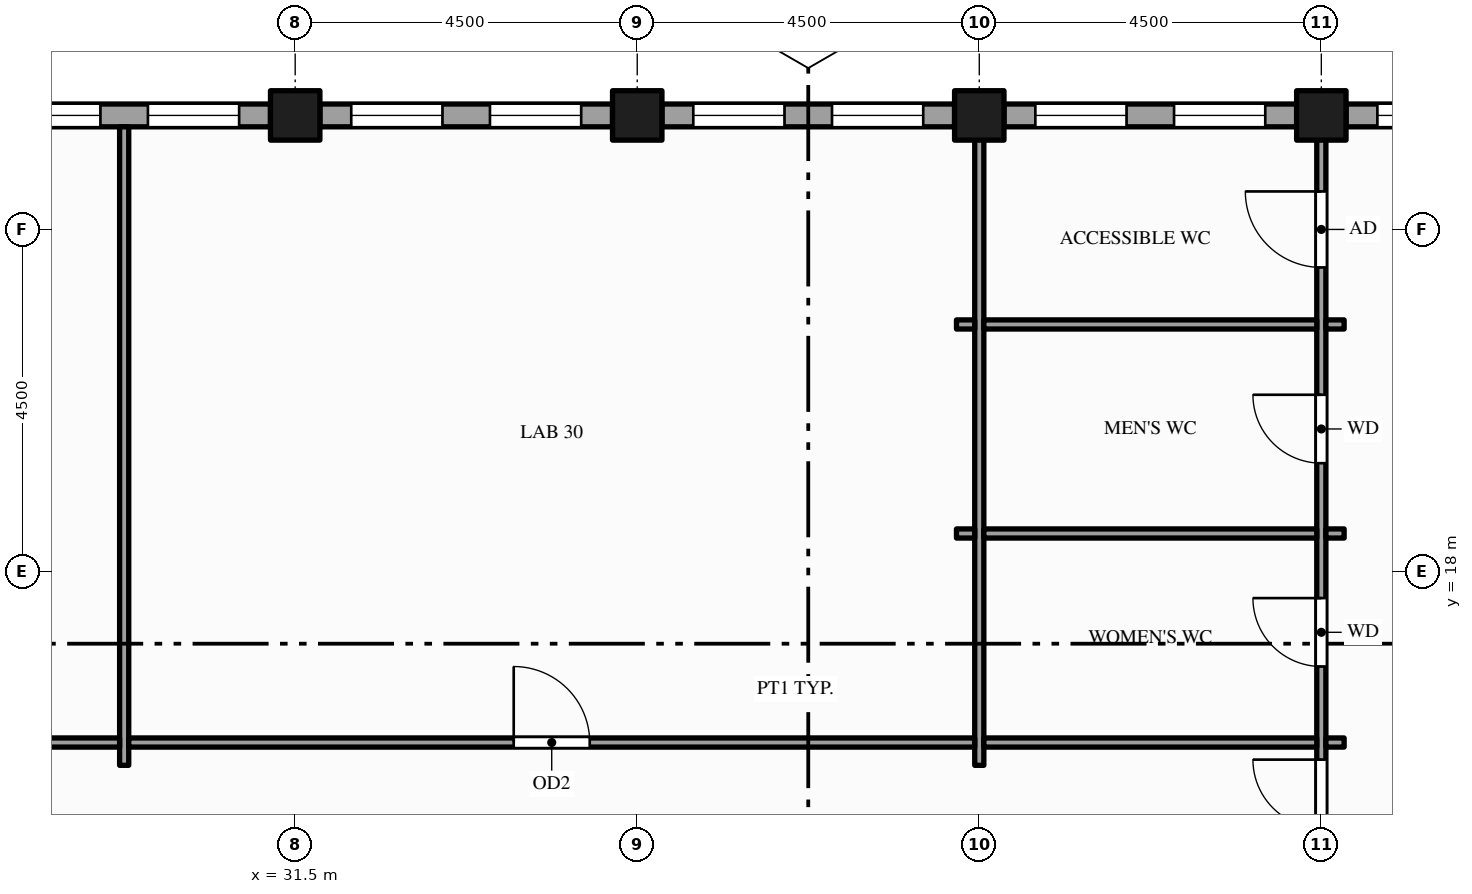
"""IFC4 building model, lengths in metres.
Left out: names, types, materials, properties, quantities, classifications, styles, units other than length and angle.
Written with IfcOpenShell. Run it as: python <this file> out.ifc"""

import sys

from ifc_helpers import new_model, si_unit, direction, frame, frame_2d, origin, origin_2d, place, context, subcontext, project, spatial, rectangle, hollow_rectangle, extrude, element, fill, save


model = new_model("IFC4")
c1 = context("Model", 3, precision=1e-05, world=origin(), true_north=direction((0.0, 1.0)))
c2 = subcontext(c1, "Body", "Model", "MODEL_VIEW")
j1 = project(units=[si_unit("LENGTHUNIT", "METRE"), si_unit("PLANEANGLEUNIT", "RADIAN")], contexts=[c1])
p1 = place(None, origin())
s1 = spatial("IfcSite", under=j1, at=p1, CompositionType="ELEMENT")
p2 = place(p1, origin())
s2 = spatial("IfcBuilding", under=s1, at=p2, CompositionType="ELEMENT")
p3 = place(p2, frame((0.0, 0.0, 281.0)))
s3 = spatial("IfcBuildingStorey", under=s2, at=p3, CompositionType="ELEMENT", Elevation=281.0)
for number, where, z_axis, x_axis in (
    (1, (31.5, 24.0, -0.15), (0.0, 0.0, 1.0), (1.0, 0.0, 0.0)),
    (2, (36.0, 24.0, -0.15), (0.0, 0.0, 1.0), (1.0, 0.0, 0.0)),
    (3, (40.5, 24.0, -0.15), (0.0, 0.0, 1.0), (1.0, 0.0, 0.0)),
    (4, (45.0, 24.0, -0.15), (0.0, 0.0, 1.0), (1.0, 0.0, 0.0)),
):
    element("IfcColumn", number, at=place(p3, frame(where, z_axis=z_axis, x_axis=x_axis)), inside=s3, PredefinedType="COLUMN", context=c2, shape_type="SweptSolid", body=[
        extrude(hollow_rectangle(XDim=0.65, YDim=0.65, WallThickness=0.032, at=origin_2d()), origin(), (0.0, 0.0, 1.0), 4.0),
    ])
p4 = place(p3, frame((49.175, 24.0, 0.0), z_axis=(0.0, 0.0, 1.0), x_axis=(-1.0, 0.0, 0.0)))
e5 = element("IfcWall", 5, at=p4, inside=s3, PredefinedType="STANDARD", context=c2, shape_type="SweptSolid", body=[
    extrude(rectangle(XDim=3.85, YDim=0.3, at=frame_2d((1.925, 0.0))), origin(), (0.0, 0.0, 1.0), 2.87),
])
p5 = place(p4, frame((0.413, 0.0, 0.9)))
e6 = element("IfcOpeningElement", 6, at=p5, cuts=e5, PredefinedType="OPENING", context=c2, shape_type="SweptSolid", body=[
    extrude(rectangle(XDim=1.2, YDim=1.75, at=frame_2d((0.6, 0.875))), frame((0.0, 0.16, 0.0), z_axis=(0.0, -1.0, 0.0), x_axis=(1.0, 0.0, 0.0)), (0.0, 0.0, 1.0), 0.32),
])
p6 = place(p4, frame((2.238, 0.0, 0.9)))
e7 = element("IfcOpeningElement", 7, at=p6, cuts=e5, PredefinedType="OPENING", context=c2, shape_type="SweptSolid", body=[
    extrude(rectangle(XDim=1.2, YDim=1.75, at=frame_2d((0.6, 0.875))), frame((0.0, 0.16, 0.0), z_axis=(0.0, -1.0, 0.0), x_axis=(1.0, 0.0, 0.0)), (0.0, 0.0, 1.0), 0.32),
])
p7 = place(p3, frame((44.675, 24.0, 0.0), z_axis=(0.0, 0.0, 1.0), x_axis=(-1.0, 0.0, 0.0)))
e8 = element("IfcWall", 8, at=p7, inside=s3, PredefinedType="STANDARD", context=c2, shape_type="SweptSolid", body=[
    extrude(rectangle(XDim=3.85, YDim=0.3, at=frame_2d((1.925, 0.0))), origin(), (0.0, 0.0, 1.0), 2.87),
])
p8 = place(p7, frame((0.413, 0.0, 0.9)))
e9 = element("IfcOpeningElement", 9, at=p8, cuts=e8, PredefinedType="OPENING", context=c2, shape_type="SweptSolid", body=[
    extrude(rectangle(XDim=1.2, YDim=1.75, at=frame_2d((0.6, 0.875))), frame((0.0, 0.16, 0.0), z_axis=(0.0, -1.0, 0.0), x_axis=(1.0, 0.0, 0.0)), (0.0, 0.0, 1.0), 0.32),
])
p9 = place(p7, frame((2.238, 0.0, 0.9)))
e10 = element("IfcOpeningElement", 10, at=p9, cuts=e8, PredefinedType="OPENING", context=c2, shape_type="SweptSolid", body=[
    extrude(rectangle(XDim=1.2, YDim=1.75, at=frame_2d((0.6, 0.875))), frame((0.0, 0.16, 0.0), z_axis=(0.0, -1.0, 0.0), x_axis=(1.0, 0.0, 0.0)), (0.0, 0.0, 1.0), 0.32),
])
p10 = place(p3, frame((40.175, 24.0, 0.0), z_axis=(0.0, 0.0, 1.0), x_axis=(-1.0, 0.0, 0.0)))
e11 = element("IfcWall", 11, at=p10, inside=s3, PredefinedType="STANDARD", context=c2, shape_type="SweptSolid", body=[
    extrude(rectangle(XDim=3.85, YDim=0.3, at=frame_2d((1.925, 0.0))), origin(), (0.0, 0.0, 1.0), 2.87),
])
p11 = place(p10, frame((0.413, 0.0, 0.9)))
e12 = element("IfcOpeningElement", 12, at=p11, cuts=e11, PredefinedType="OPENING", context=c2, shape_type="SweptSolid", body=[
    extrude(rectangle(XDim=1.2, YDim=1.75, at=frame_2d((0.6, 0.875))), frame((0.0, 0.16, 0.0), z_axis=(0.0, -1.0, 0.0), x_axis=(1.0, 0.0, 0.0)), (0.0, 0.0, 1.0), 0.32),
])
p12 = place(p10, frame((2.238, 0.0, 0.9)))
e13 = element("IfcOpeningElement", 13, at=p12, cuts=e11, PredefinedType="OPENING", context=c2, shape_type="SweptSolid", body=[
    extrude(rectangle(XDim=1.2, YDim=1.75, at=frame_2d((0.6, 0.875))), frame((0.0, 0.16, 0.0), z_axis=(0.0, -1.0, 0.0), x_axis=(1.0, 0.0, 0.0)), (0.0, 0.0, 1.0), 0.32),
])
p13 = place(p3, frame((35.675, 24.0, 0.0), z_axis=(0.0, 0.0, 1.0), x_axis=(-1.0, 0.0, 0.0)))
e14 = element("IfcWall", 14, at=p13, inside=s3, PredefinedType="STANDARD", context=c2, shape_type="SweptSolid", body=[
    extrude(rectangle(XDim=3.85, YDim=0.3, at=frame_2d((1.925, 0.0))), origin(), (0.0, 0.0, 1.0), 2.87),
])
p14 = place(p13, frame((0.413, 0.0, 0.9)))
e15 = element("IfcOpeningElement", 15, at=p14, cuts=e14, PredefinedType="OPENING", context=c2, shape_type="SweptSolid", body=[
    extrude(rectangle(XDim=1.2, YDim=1.75, at=frame_2d((0.6, 0.875))), frame((0.0, 0.16, 0.0), z_axis=(0.0, -1.0, 0.0), x_axis=(1.0, 0.0, 0.0)), (0.0, 0.0, 1.0), 0.32),
])
p15 = place(p13, frame((2.238, 0.0, 0.9)))
e16 = element("IfcOpeningElement", 16, at=p15, cuts=e14, PredefinedType="OPENING", context=c2, shape_type="SweptSolid", body=[
    extrude(rectangle(XDim=1.2, YDim=1.75, at=frame_2d((0.6, 0.875))), frame((0.0, 0.16, 0.0), z_axis=(0.0, -1.0, 0.0), x_axis=(1.0, 0.0, 0.0)), (0.0, 0.0, 1.0), 0.32),
])
p16 = place(p3, frame((31.175, 24.0, 0.0), z_axis=(0.0, 0.0, 1.0), x_axis=(-1.0, 0.0, 0.0)))
e17 = element("IfcWall", 17, at=p16, inside=s3, PredefinedType="STANDARD", context=c2, shape_type="SweptSolid", body=[
    extrude(rectangle(XDim=3.85, YDim=0.3, at=frame_2d((1.925, 0.0))), origin(), (0.0, 0.0, 1.0), 2.87),
])
p17 = place(p16, frame((0.413, 0.0, 0.9)))
e18 = element("IfcOpeningElement", 18, at=p17, cuts=e17, PredefinedType="OPENING", context=c2, shape_type="SweptSolid", body=[
    extrude(rectangle(XDim=1.2, YDim=1.75, at=frame_2d((0.6, 0.875))), frame((0.0, 0.16, 0.0), z_axis=(0.0, -1.0, 0.0), x_axis=(1.0, 0.0, 0.0)), (0.0, 0.0, 1.0), 0.32),
])
p18 = place(p16, frame((2.238, 0.0, 0.9)))
e19 = element("IfcOpeningElement", 19, at=p18, cuts=e17, PredefinedType="OPENING", context=c2, shape_type="SweptSolid", body=[
    extrude(rectangle(XDim=1.2, YDim=1.75, at=frame_2d((0.6, 0.875))), frame((0.0, 0.16, 0.0), z_axis=(0.0, -1.0, 0.0), x_axis=(1.0, 0.0, 0.0)), (0.0, 0.0, 1.0), 0.32),
])
for number, where, z_axis, x_axis in (
    (20, (29.25, 15.45, 0.0), (0.0, 0.0, 1.0), (0.0, 1.0, 0.0)),
    (21, (40.5, 15.45, 0.0), (0.0, 0.0, 1.0), (0.0, 1.0, 0.0)),
):
    element("IfcWall", number, at=place(p3, frame(where, z_axis=z_axis, x_axis=x_axis)), inside=s3, PredefinedType="PARTITIONING", context=c2, shape_type="SweptSolid", body=[
        extrude(rectangle(XDim=8.4, YDim=0.12, at=frame_2d((4.2, 0.0))), origin(), (0.0, 0.0, 1.0), 2.87),
    ])
p19 = place(p3, frame((45.0, 1.65, 0.0), z_axis=(0.0, 0.0, 1.0), x_axis=(0.0, 1.0, 0.0)))
e22 = element("IfcWall", 22, at=p19, inside=s3, PredefinedType="PARTITIONING", context=c2, shape_type="SweptSolid", body=[
    extrude(rectangle(XDim=22.2, YDim=0.12, at=frame_2d((11.1, 0.0))), origin(), (0.0, 0.0, 1.0), 2.87),
])
p20 = place(p19, frame((12.075, 0.0, 0.0)))
e23 = element("IfcOpeningElement", 23, at=p20, cuts=e22, PredefinedType="OPENING", context=c2, shape_type="SweptSolid", body=[
    extrude(rectangle(XDim=1.8, YDim=2.1, at=frame_2d((0.9, 1.05))), frame((0.0, 0.07, 0.0), z_axis=(0.0, -1.0, 0.0), x_axis=(1.0, 0.0, 0.0)), (0.0, 0.0, 1.0), 0.14),
])
p21 = place(p19, frame((15.1, 0.0, 0.0)))
e24 = element("IfcOpeningElement", 24, at=p21, cuts=e22, PredefinedType="OPENING", context=c2, shape_type="SweptSolid", body=[
    extrude(rectangle(XDim=0.9, YDim=2.1, at=frame_2d((0.45, 1.05))), frame((0.0, 0.07, 0.0), z_axis=(0.0, -1.0, 0.0), x_axis=(1.0, 0.0, 0.0)), (0.0, 0.0, 1.0), 0.14),
])
p22 = place(p19, frame((17.775, 0.0, 0.0)))
e25 = element("IfcOpeningElement", 25, at=p22, cuts=e22, PredefinedType="OPENING", context=c2, shape_type="SweptSolid", body=[
    extrude(rectangle(XDim=0.9, YDim=2.1, at=frame_2d((0.45, 1.05))), frame((0.0, 0.07, 0.0), z_axis=(0.0, -1.0, 0.0), x_axis=(1.0, 0.0, 0.0)), (0.0, 0.0, 1.0), 0.14),
])
p23 = place(p19, frame((20.35, 0.0, 0.0)))
e26 = element("IfcOpeningElement", 26, at=p23, cuts=e22, PredefinedType="OPENING", context=c2, shape_type="SweptSolid", body=[
    extrude(rectangle(XDim=1.0, YDim=2.1, at=frame_2d((0.5, 1.05))), frame((0.0, 0.07, 0.0), z_axis=(0.0, -1.0, 0.0), x_axis=(1.0, 0.0, 0.0)), (0.0, 0.0, 1.0), 0.14),
])
p24 = place(p3, frame((24.81, 15.75, 0.0), z_axis=(0.0, 0.0, 1.0), x_axis=(1.0, 0.0, 0.0)))
e27 = element("IfcWall", 27, at=p24, inside=s3, PredefinedType="PARTITIONING", context=c2, shape_type="SweptSolid", body=[
    extrude(rectangle(XDim=4.38, YDim=0.12, at=frame_2d((2.19, 0.0))), origin(), (0.0, 0.0, 1.0), 2.87),
])
p25 = place(p24, frame((1.69, 0.0, 0.0)))
e28 = element("IfcOpeningElement", 28, at=p25, cuts=e27, PredefinedType="OPENING", context=c2, shape_type="SweptSolid", body=[
    extrude(rectangle(XDim=1.0, YDim=2.1, at=frame_2d((0.5, 1.05))), frame((0.0, 0.07, 0.0), z_axis=(0.0, -1.0, 0.0), x_axis=(1.0, 0.0, 0.0)), (0.0, 0.0, 1.0), 0.14),
])
p26 = place(p3, frame((29.31, 15.75, 0.0), z_axis=(0.0, 0.0, 1.0), x_axis=(1.0, 0.0, 0.0)))
e29 = element("IfcWall", 29, at=p26, inside=s3, PredefinedType="PARTITIONING", context=c2, shape_type="SweptSolid", body=[
    extrude(rectangle(XDim=11.13, YDim=0.12, at=frame_2d((5.565, 0.0))), origin(), (0.0, 0.0, 1.0), 2.87),
])
p27 = place(p26, frame((5.065, 0.0, 0.0)))
e30 = element("IfcOpeningElement", 30, at=p27, cuts=e29, PredefinedType="OPENING", context=c2, shape_type="SweptSolid", body=[
    extrude(rectangle(XDim=1.0, YDim=2.1, at=frame_2d((0.5, 1.05))), frame((0.0, 0.07, 0.0), z_axis=(0.0, -1.0, 0.0), x_axis=(1.0, 0.0, 0.0)), (0.0, 0.0, 1.0), 0.14),
])
p28 = place(p3, frame((40.56, 15.75, 0.0), z_axis=(0.0, 0.0, 1.0), x_axis=(1.0, 0.0, 0.0)))
e31 = element("IfcWall", 31, at=p28, inside=s3, PredefinedType="PARTITIONING", context=c2, shape_type="SweptSolid", body=[
    extrude(rectangle(XDim=4.38, YDim=0.12, at=frame_2d((2.19, 0.0))), origin(), (0.0, 0.0, 1.0), 2.87),
])
for number, where, z_axis, x_axis in (
    (32, (45.06, 15.75, 0.0), (0.0, 0.0, 1.0), (1.0, 0.0, 0.0)),
    (33, (40.2, 18.5, 0.0), (0.0, 0.0, 1.0), (1.0, 0.0, 0.0)),
):
    element("IfcWall", number, at=place(p3, frame(where, z_axis=z_axis, x_axis=x_axis)), inside=s3, PredefinedType="PARTITIONING", context=c2, shape_type="SweptSolid", body=[
        extrude(rectangle(XDim=0.24, YDim=0.12, at=frame_2d((0.12, 0.0))), origin(), (0.0, 0.0, 1.0), 2.87),
    ])
p29 = place(p3, frame((40.56, 18.5, 0.0), z_axis=(0.0, 0.0, 1.0), x_axis=(1.0, 0.0, 0.0)))
e34 = element("IfcWall", 34, at=p29, inside=s3, PredefinedType="PARTITIONING", context=c2, shape_type="SweptSolid", body=[
    extrude(rectangle(XDim=4.38, YDim=0.12, at=frame_2d((2.19, 0.0))), origin(), (0.0, 0.0, 1.0), 2.87),
])
for number, where, z_axis, x_axis in (
    (35, (45.06, 18.5, 0.0), (0.0, 0.0, 1.0), (1.0, 0.0, 0.0)),
    (36, (40.2, 21.25, 0.0), (0.0, 0.0, 1.0), (1.0, 0.0, 0.0)),
):
    element("IfcWall", number, at=place(p3, frame(where, z_axis=z_axis, x_axis=x_axis)), inside=s3, PredefinedType="PARTITIONING", context=c2, shape_type="SweptSolid", body=[
        extrude(rectangle(XDim=0.24, YDim=0.12, at=frame_2d((0.12, 0.0))), origin(), (0.0, 0.0, 1.0), 2.87),
    ])
p30 = place(p3, frame((40.56, 21.25, 0.0), z_axis=(0.0, 0.0, 1.0), x_axis=(1.0, 0.0, 0.0)))
e37 = element("IfcWall", 37, at=p30, inside=s3, PredefinedType="PARTITIONING", context=c2, shape_type="SweptSolid", body=[
    extrude(rectangle(XDim=4.38, YDim=0.12, at=frame_2d((2.19, 0.0))), origin(), (0.0, 0.0, 1.0), 2.87),
])
p31 = place(p3, frame((45.06, 21.25, 0.0), z_axis=(0.0, 0.0, 1.0), x_axis=(1.0, 0.0, 0.0)))
e38 = element("IfcWall", 38, at=p31, inside=s3, PredefinedType="PARTITIONING", context=c2, shape_type="SweptSolid", body=[
    extrude(rectangle(XDim=0.24, YDim=0.12, at=frame_2d((0.12, 0.0))), origin(), (0.0, 0.0, 1.0), 2.87),
])
p32 = place(p6, origin())
e39 = element("IfcWindow", 39, at=p32, inside=s3, PartitioningType="SINGLE_PANEL", PredefinedType="WINDOW", context=c2, shape_type="SweptSolid", body=[
    extrude(rectangle(XDim=1.2, YDim=1.75, at=frame_2d((0.6, 0.875))), frame((0.0, 0.03, 0.0), z_axis=(0.0, -1.0, 0.0), x_axis=(1.0, 0.0, 0.0)), (0.0, 0.0, 1.0), 0.06),
])
fill(e7, e39)
p33 = place(p8, origin())
e40 = element("IfcWindow", 40, at=p33, inside=s3, PartitioningType="SINGLE_PANEL", PredefinedType="WINDOW", context=c2, shape_type="SweptSolid", body=[
    extrude(rectangle(XDim=1.2, YDim=1.75, at=frame_2d((0.6, 0.875))), frame((0.0, 0.03, 0.0), z_axis=(0.0, -1.0, 0.0), x_axis=(1.0, 0.0, 0.0)), (0.0, 0.0, 1.0), 0.06),
])
fill(e9, e40)
p34 = place(p9, origin())
e41 = element("IfcWindow", 41, at=p34, inside=s3, PartitioningType="SINGLE_PANEL", PredefinedType="WINDOW", context=c2, shape_type="SweptSolid", body=[
    extrude(rectangle(XDim=1.2, YDim=1.75, at=frame_2d((0.6, 0.875))), frame((0.0, 0.03, 0.0), z_axis=(0.0, -1.0, 0.0), x_axis=(1.0, 0.0, 0.0)), (0.0, 0.0, 1.0), 0.06),
])
fill(e10, e41)
p35 = place(p11, origin())
e42 = element("IfcWindow", 42, at=p35, inside=s3, PartitioningType="SINGLE_PANEL", PredefinedType="WINDOW", context=c2, shape_type="SweptSolid", body=[
    extrude(rectangle(XDim=1.2, YDim=1.75, at=frame_2d((0.6, 0.875))), frame((0.0, 0.03, 0.0), z_axis=(0.0, -1.0, 0.0), x_axis=(1.0, 0.0, 0.0)), (0.0, 0.0, 1.0), 0.06),
])
fill(e12, e42)
p36 = place(p12, origin())
e43 = element("IfcWindow", 43, at=p36, inside=s3, PartitioningType="SINGLE_PANEL", PredefinedType="WINDOW", context=c2, shape_type="SweptSolid", body=[
    extrude(rectangle(XDim=1.2, YDim=1.75, at=frame_2d((0.6, 0.875))), frame((0.0, 0.03, 0.0), z_axis=(0.0, -1.0, 0.0), x_axis=(1.0, 0.0, 0.0)), (0.0, 0.0, 1.0), 0.06),
])
fill(e13, e43)
p37 = place(p14, origin())
e44 = element("IfcWindow", 44, at=p37, inside=s3, PartitioningType="SINGLE_PANEL", PredefinedType="WINDOW", context=c2, shape_type="SweptSolid", body=[
    extrude(rectangle(XDim=1.2, YDim=1.75, at=frame_2d((0.6, 0.875))), frame((0.0, 0.03, 0.0), z_axis=(0.0, -1.0, 0.0), x_axis=(1.0, 0.0, 0.0)), (0.0, 0.0, 1.0), 0.06),
])
fill(e15, e44)
p38 = place(p15, origin())
e45 = element("IfcWindow", 45, at=p38, inside=s3, PartitioningType="SINGLE_PANEL", PredefinedType="WINDOW", context=c2, shape_type="SweptSolid", body=[
    extrude(rectangle(XDim=1.2, YDim=1.75, at=frame_2d((0.6, 0.875))), frame((0.0, 0.03, 0.0), z_axis=(0.0, -1.0, 0.0), x_axis=(1.0, 0.0, 0.0)), (0.0, 0.0, 1.0), 0.06),
])
fill(e16, e45)
p39 = place(p17, origin())
e46 = element("IfcWindow", 46, at=p39, inside=s3, PartitioningType="SINGLE_PANEL", PredefinedType="WINDOW", context=c2, shape_type="SweptSolid", body=[
    extrude(rectangle(XDim=1.2, YDim=1.75, at=frame_2d((0.6, 0.875))), frame((0.0, 0.03, 0.0), z_axis=(0.0, -1.0, 0.0), x_axis=(1.0, 0.0, 0.0)), (0.0, 0.0, 1.0), 0.06),
])
fill(e18, e46)
p40 = place(p18, origin())
e47 = element("IfcWindow", 47, at=p40, inside=s3, PartitioningType="SINGLE_PANEL", PredefinedType="WINDOW", context=c2, shape_type="SweptSolid", body=[
    extrude(rectangle(XDim=1.2, YDim=1.75, at=frame_2d((0.6, 0.875))), frame((0.0, 0.03, 0.0), z_axis=(0.0, -1.0, 0.0), x_axis=(1.0, 0.0, 0.0)), (0.0, 0.0, 1.0), 0.06),
])
fill(e19, e47)
p41 = place(p20, origin())
e48 = element("IfcDoor", 48, at=p41, inside=s3, OperationType="DOUBLE_DOOR_SINGLE_SWING", PredefinedType="DOOR", context=c2, shape_type="SweptSolid", body=[
    extrude(rectangle(XDim=1.8, YDim=2.1, at=frame_2d((0.9, 1.05))), frame((0.0, 0.025, 0.0), z_axis=(0.0, -1.0, 0.0), x_axis=(1.0, 0.0, 0.0)), (0.0, 0.0, 1.0), 0.05),
])
fill(e23, e48)
p42 = place(p27, origin())
e49 = element("IfcDoor", 49, at=p42, inside=s3, OperationType="SINGLE_SWING_LEFT", PredefinedType="DOOR", context=c2, shape_type="SweptSolid", body=[
    extrude(rectangle(XDim=1.0, YDim=2.1, at=frame_2d((0.5, 1.05))), frame((0.0, 0.025, 0.0), z_axis=(0.0, -1.0, 0.0), x_axis=(1.0, 0.0, 0.0)), (0.0, 0.0, 1.0), 0.05),
])
fill(e30, e49)
p43 = place(p21, origin())
e50 = element("IfcDoor", 50, at=p43, inside=s3, OperationType="SINGLE_SWING_RIGHT", PredefinedType="DOOR", context=c2, shape_type="SweptSolid", body=[
    extrude(rectangle(XDim=0.9, YDim=2.1, at=frame_2d((0.45, 1.05))), frame((0.0, 0.025, 0.0), z_axis=(0.0, -1.0, 0.0), x_axis=(1.0, 0.0, 0.0)), (0.0, 0.0, 1.0), 0.05),
])
fill(e24, e50)
p44 = place(p22, origin())
e51 = element("IfcDoor", 51, at=p44, inside=s3, OperationType="SINGLE_SWING_RIGHT", PredefinedType="DOOR", context=c2, shape_type="SweptSolid", body=[
    extrude(rectangle(XDim=0.9, YDim=2.1, at=frame_2d((0.45, 1.05))), frame((0.0, 0.025, 0.0), z_axis=(0.0, -1.0, 0.0), x_axis=(1.0, 0.0, 0.0)), (0.0, 0.0, 1.0), 0.05),
])
fill(e25, e51)
p45 = place(p23, origin())
e52 = element("IfcDoor", 52, at=p45, inside=s3, OperationType="SINGLE_SWING_RIGHT", PredefinedType="DOOR", context=c2, shape_type="SweptSolid", body=[
    extrude(rectangle(XDim=1.0, YDim=2.1, at=frame_2d((0.5, 1.05))), frame((0.0, 0.025, 0.0), z_axis=(0.0, -1.0, 0.0), x_axis=(1.0, 0.0, 0.0)), (0.0, 0.0, 1.0), 0.05),
])
fill(e26, e52)
save(model, sys.argv[1])
